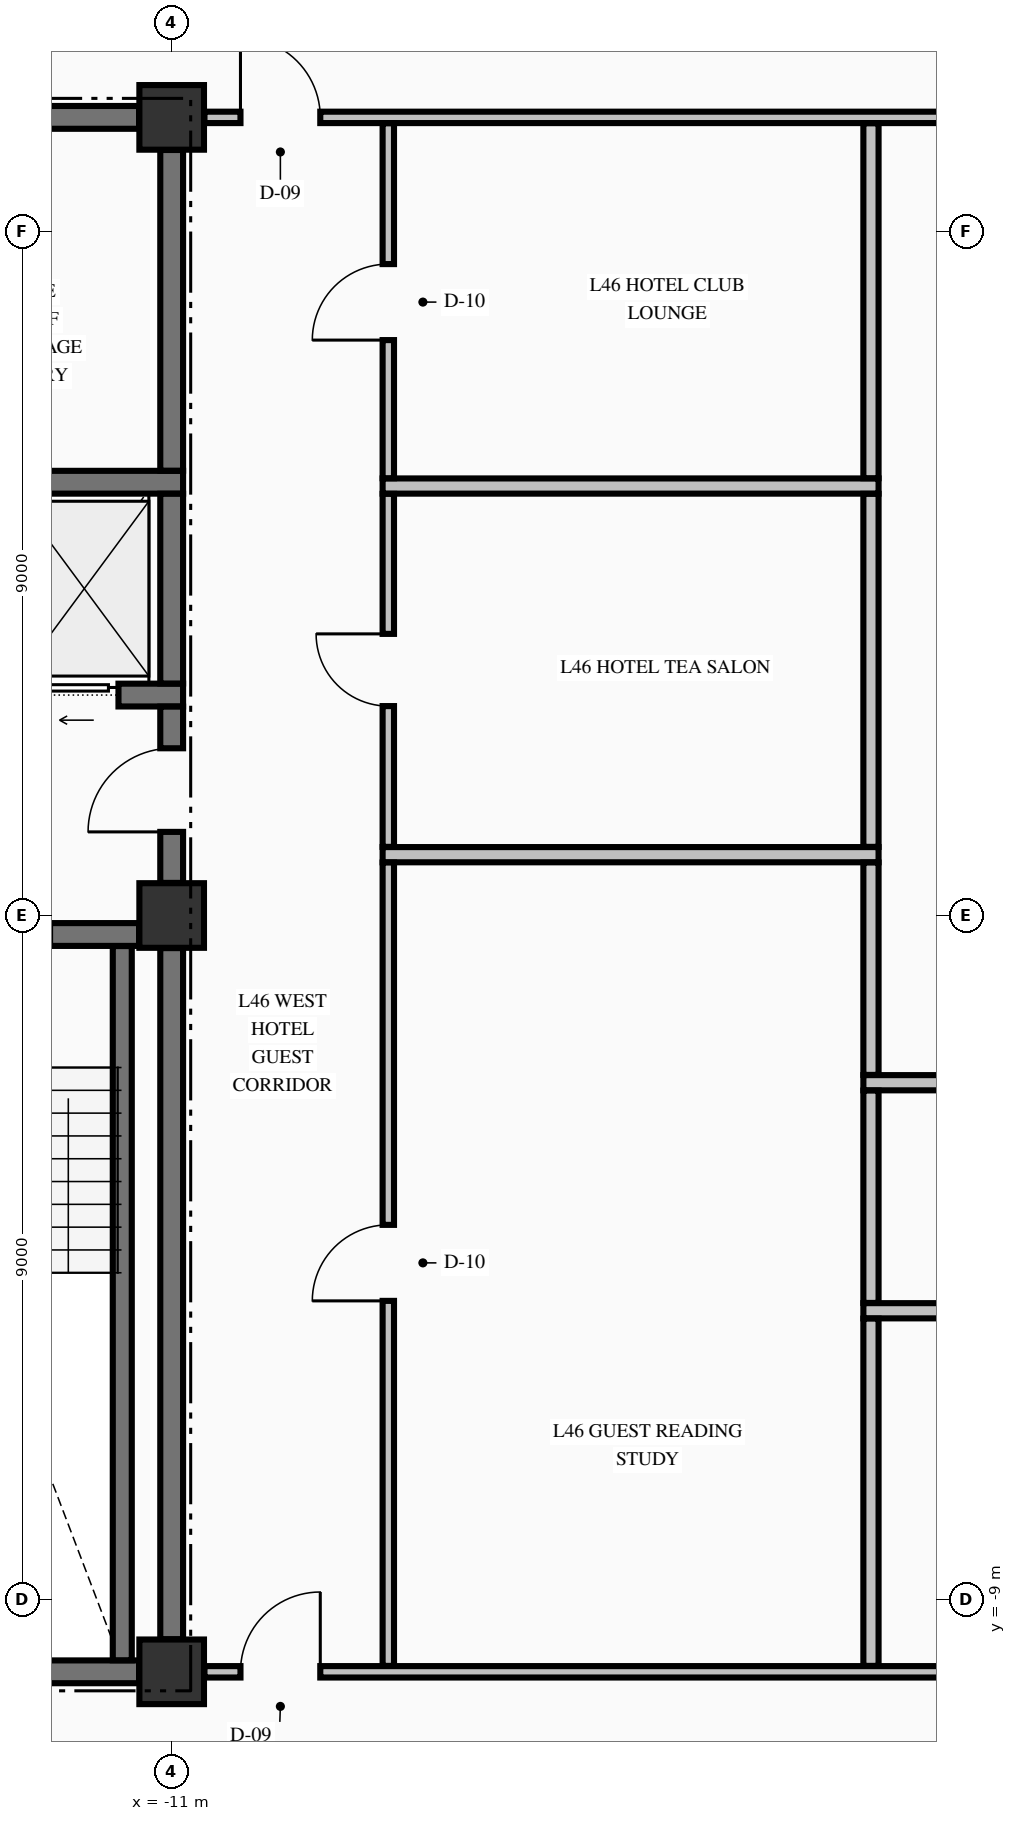
"""IFC4 building model, lengths in metres.
Left out: names, types, materials, properties, quantities, classifications, styles, units other than length and angle.
Written with IfcOpenShell. Run it as: python <this file> out.ifc"""

import sys

from ifc_helpers import new_model, si_unit, direction, frame, frame_2d, origin, origin_2d, place, context, subcontext, project, spatial, rectangle, extrude, element, fill, save


model = new_model("IFC4")
c1 = context("Model", 3, precision=1e-05, world=origin(), true_north=direction((0.0, 1.0)))
c2 = subcontext(c1, "Body", "Model", "MODEL_VIEW")
j1 = project(units=[si_unit("LENGTHUNIT", "METRE"), si_unit("PLANEANGLEUNIT", "RADIAN")], contexts=[c1])
p1 = place(None, origin())
s1 = spatial("IfcSite", under=j1, at=p1, CompositionType="ELEMENT")
p2 = place(p1, origin())
s2 = spatial("IfcBuilding", under=s1, at=p2, CompositionType="ELEMENT")
p3 = place(p2, frame((0.0, 0.0, 179.66)))
s3 = spatial("IfcBuildingStorey", under=s2, at=p3, CompositionType="ELEMENT", Elevation=179.66)
for number, where, z_axis, x_axis in (
    (1, (-11.0, -9.95, -0.25), (0.0, 0.0, 1.0), (1.0, 0.0, 0.0)),
    (2, (-11.0, 0.0, -0.25), (0.0, 0.0, 1.0), (1.0, 0.0, 0.0)),
    (3, (-11.0, 10.5, -0.25), (0.0, 0.0, 1.0), (1.0, 0.0, 0.0)),
):
    element("IfcColumn", number, at=place(p3, frame(where, z_axis=z_axis, x_axis=x_axis)), inside=s3, PredefinedType="COLUMN", context=c2, shape_type="SweptSolid", body=[
        extrude(rectangle(XDim=0.85, YDim=0.85, at=origin_2d()), origin(), (0.0, 0.0, 1.0), 3.4),
    ])
p4 = place(p3, frame((-14.7, -9.95, 0.0), z_axis=(0.0, 0.0, 1.0), x_axis=(1.0, 0.0, 0.0)))
e4 = element("IfcWall", 4, at=p4, inside=s3, PredefinedType="SHEAR", context=c2, shape_type="SweptSolid", body=[
    extrude(rectangle(XDim=3.271, YDim=0.3, at=frame_2d((1.635, 0.0))), origin(), (0.0, 0.0, 1.0), 3.15),
])
p5 = place(p3, frame((-19.571, -0.25, 0.0), z_axis=(0.0, 0.0, 1.0), x_axis=(1.0, 0.0, 0.0)))
e5 = element("IfcWall", 5, at=p5, inside=s3, PredefinedType="SHEAR", context=c2, shape_type="SweptSolid", body=[
    extrude(rectangle(XDim=8.142, YDim=0.3, at=frame_2d((4.071, 0.0))), origin(), (0.0, 0.0, 1.0), 3.15),
])
p6 = place(p5, frame((5.871, 0.0, 0.0)))
e6 = element("IfcOpeningElement", 6, at=p6, cuts=e5, PredefinedType="OPENING", context=c2, shape_type="SweptSolid", body=[
    extrude(rectangle(XDim=1.1, YDim=2.15, at=frame_2d((0.55, 1.075))), frame((0.0, 0.16, 0.0), z_axis=(0.0, -1.0, 0.0), x_axis=(1.0, 0.0, 0.0)), (0.0, 0.0, 1.0), 0.32),
])
p7 = place(p3, frame((-14.875, 2.9, 0.0), z_axis=(0.0, 0.0, 1.0), x_axis=(1.0, 0.0, 0.0)))
e7 = element("IfcWall", 7, at=p7, inside=s3, PredefinedType="SHEAR", context=c2, shape_type="SweptSolid", body=[
    extrude(rectangle(XDim=4.025, YDim=0.3, at=frame_2d((2.012, 0.0))), origin(), (0.0, 0.0, 1.0), 3.15),
])
p8 = place(p7, frame((2.075, 0.0, 0.0)))
e8 = element("IfcOpeningElement", 8, at=p8, cuts=e7, PredefinedType="OPENING", context=c2, shape_type="SweptSolid", body=[
    extrude(rectangle(XDim=1.1, YDim=2.2, at=frame_2d((0.55, 1.1))), frame((0.0, 0.16, 0.0), z_axis=(0.0, -1.0, 0.0), x_axis=(1.0, 0.0, 0.0)), (0.0, 0.0, 1.0), 0.32),
])
p9 = place(p3, frame((-14.875, 5.7, 0.0), z_axis=(0.0, 0.0, 1.0), x_axis=(1.0, 0.0, 0.0)))
e9 = element("IfcWall", 9, at=p9, inside=s3, PredefinedType="SHEAR", context=c2, shape_type="SweptSolid", body=[
    extrude(rectangle(XDim=4.025, YDim=0.3, at=frame_2d((2.012, 0.0))), origin(), (0.0, 0.0, 1.0), 3.15),
])
p10 = place(p3, frame((-14.7, 10.5, 0.0), z_axis=(0.0, 0.0, 1.0), x_axis=(1.0, 0.0, 0.0)))
e10 = element("IfcWall", 10, at=p10, inside=s3, PredefinedType="SHEAR", context=c2, shape_type="SweptSolid", body=[
    extrude(rectangle(XDim=3.271, YDim=0.3, at=frame_2d((1.635, 0.0))), origin(), (0.0, 0.0, 1.0), 3.15),
])
p11 = place(p10, frame((0.775, 0.0, 0.0)))
e11 = element("IfcOpeningElement", 11, at=p11, cuts=e10, PredefinedType="OPENING", context=c2, shape_type="SweptSolid", body=[
    extrude(rectangle(XDim=0.95, YDim=2.15, at=frame_2d((0.475, 1.075))), frame((0.0, 0.16, 0.0), z_axis=(0.0, -1.0, 0.0), x_axis=(1.0, 0.0, 0.0)), (0.0, 0.0, 1.0), 0.32),
])
p12 = place(p3, frame((-10.569, -9.95, 0.0), z_axis=(0.0, 0.0, 1.0), x_axis=(1.0, 0.0, 0.0)))
e12 = element("IfcWall", 12, at=p12, inside=s3, PredefinedType="PARTITIONING", context=c2, shape_type="SweptSolid", body=[
    extrude(rectangle(XDim=21.138, YDim=0.15, at=frame_2d((10.569, 0.0))), origin(), (0.0, 0.0, 1.0), 3.15),
])
p13 = place(p12, frame((0.474, 0.0, 0.0)))
e13 = element("IfcOpeningElement", 13, at=p13, cuts=e12, PredefinedType="OPENING", context=c2, shape_type="SweptSolid", body=[
    extrude(rectangle(XDim=1.05, YDim=2.15, at=frame_2d((0.525, 1.075))), frame((0.0, 0.085, 0.0), z_axis=(0.0, -1.0, 0.0), x_axis=(1.0, 0.0, 0.0)), (0.0, 0.0, 1.0), 0.17),
])
p14 = place(p12, frame((19.614, 0.0, 0.0)))
e14 = element("IfcOpeningElement", 14, at=p14, cuts=e12, PredefinedType="OPENING", context=c2, shape_type="SweptSolid", body=[
    extrude(rectangle(XDim=1.05, YDim=2.15, at=frame_2d((0.525, 1.075))), frame((0.0, 0.085, 0.0), z_axis=(0.0, -1.0, 0.0), x_axis=(1.0, 0.0, 0.0)), (0.0, 0.0, 1.0), 0.17),
])
p15 = place(p12, frame((11.774, 0.0, 0.0)))
e15 = element("IfcOpeningElement", 15, at=p15, cuts=e12, PredefinedType="OPENING", context=c2, shape_type="SweptSolid", body=[
    extrude(rectangle(XDim=0.95, YDim=2.15, at=frame_2d((0.475, 1.075))), frame((0.0, 0.085, 0.0), z_axis=(0.0, -1.0, 0.0), x_axis=(1.0, 0.0, 0.0)), (0.0, 0.0, 1.0), 0.17),
])
for number, where, z_axis, x_axis in (
    (16, (-1.9, -5.2, 0.0), (0.0, 0.0, 1.0), (1.0, 0.0, 0.0)),
    (17, (-1.9, -2.2, 0.0), (0.0, 0.0, 1.0), (1.0, 0.0, 0.0)),
):
    element("IfcWall", number, at=place(p3, frame(where, z_axis=z_axis, x_axis=x_axis)), inside=s3, PredefinedType="PARTITIONING", context=c2, shape_type="SweptSolid", body=[
        extrude(rectangle(XDim=10.125, YDim=0.2, at=frame_2d((5.062, 0.0))), origin(), (0.0, 0.0, 1.0), 3.15),
    ])
for number, where, z_axis, x_axis in (
    (18, (-8.225, 0.8, 0.0), (0.0, 0.0, 1.0), (1.0, 0.0, 0.0)),
    (19, (-8.225, 5.65, 0.0), (0.0, 0.0, 1.0), (1.0, 0.0, 0.0)),
):
    element("IfcWall", number, at=place(p3, frame(where, z_axis=z_axis, x_axis=x_axis)), inside=s3, PredefinedType="PARTITIONING", context=c2, shape_type="SweptSolid", body=[
        extrude(rectangle(XDim=6.525, YDim=0.2, at=frame_2d((3.263, 0.0))), origin(), (0.0, 0.0, 1.0), 3.15),
    ])
p16 = place(p3, frame((-10.569, 10.5, 0.0), z_axis=(0.0, 0.0, 1.0), x_axis=(1.0, 0.0, 0.0)))
e20 = element("IfcWall", 20, at=p16, inside=s3, PredefinedType="PARTITIONING", context=c2, shape_type="SweptSolid", body=[
    extrude(rectangle(XDim=21.138, YDim=0.15, at=frame_2d((10.569, 0.0))), origin(), (0.0, 0.0, 1.0), 3.15),
])
p17 = place(p16, frame((0.474, 0.0, 0.0)))
e21 = element("IfcOpeningElement", 21, at=p17, cuts=e20, PredefinedType="OPENING", context=c2, shape_type="SweptSolid", body=[
    extrude(rectangle(XDim=1.05, YDim=2.15, at=frame_2d((0.525, 1.075))), frame((0.0, 0.085, 0.0), z_axis=(0.0, -1.0, 0.0), x_axis=(1.0, 0.0, 0.0)), (0.0, 0.0, 1.0), 0.17),
])
p18 = place(p16, frame((19.614, 0.0, 0.0)))
e22 = element("IfcOpeningElement", 22, at=p18, cuts=e20, PredefinedType="OPENING", context=c2, shape_type="SweptSolid", body=[
    extrude(rectangle(XDim=1.05, YDim=2.15, at=frame_2d((0.525, 1.075))), frame((0.0, 0.085, 0.0), z_axis=(0.0, -1.0, 0.0), x_axis=(1.0, 0.0, 0.0)), (0.0, 0.0, 1.0), 0.17),
])
p19 = place(p3, frame((-11.65, -9.798, 0.0), z_axis=(0.0, 0.0, 1.0), x_axis=(0.0, 1.0, 0.0)))
e23 = element("IfcWall", 23, at=p19, inside=s3, PredefinedType="SOLIDWALL", context=c2, shape_type="SweptSolid", body=[
    extrude(rectangle(XDim=9.396, YDim=0.25, at=frame_2d((4.698, 0.0))), origin(), (0.0, 0.0, 1.0), 3.15),
])
p20 = place(p3, frame((-11.0, -9.521, 0.0), z_axis=(0.0, 0.0, 1.0), x_axis=(0.0, 1.0, 0.0)))
e24 = element("IfcWall", 24, at=p20, inside=s3, PredefinedType="SHEAR", context=c2, shape_type="SweptSolid", body=[
    extrude(rectangle(XDim=9.092, YDim=0.3, at=frame_2d((4.546, 0.0))), origin(), (0.0, 0.0, 1.0), 3.15),
])
p21 = place(p3, frame((-11.0, 0.429, 0.0), z_axis=(0.0, 0.0, 1.0), x_axis=(0.0, 1.0, 0.0)))
e25 = element("IfcWall", 25, at=p21, inside=s3, PredefinedType="SHEAR", context=c2, shape_type="SweptSolid", body=[
    extrude(rectangle(XDim=2.319, YDim=0.3, at=frame_2d((1.16, 0.0))), origin(), (0.0, 0.0, 1.0), 3.15),
])
p22 = place(p21, frame((0.671, 0.0, 0.0)))
e26 = element("IfcOpeningElement", 26, at=p22, cuts=e25, PredefinedType="OPENING", context=c2, shape_type="SweptSolid", body=[
    extrude(rectangle(XDim=1.1, YDim=2.15, at=frame_2d((0.55, 1.075))), frame((0.0, 0.16, 0.0), z_axis=(0.0, -1.0, 0.0), x_axis=(1.0, 0.0, 0.0)), (0.0, 0.0, 1.0), 0.32),
])
p23 = place(p3, frame((-11.0, 3.052, 0.0), z_axis=(0.0, 0.0, 1.0), x_axis=(0.0, 1.0, 0.0)))
e27 = element("IfcWall", 27, at=p23, inside=s3, PredefinedType="SHEAR", context=c2, shape_type="SweptSolid", body=[
    extrude(rectangle(XDim=2.496, YDim=0.3, at=frame_2d((1.248, 0.0))), origin(), (0.0, 0.0, 1.0), 3.15),
])
p24 = place(p3, frame((-11.0, 5.852, 0.0), z_axis=(0.0, 0.0, 1.0), x_axis=(0.0, 1.0, 0.0)))
e28 = element("IfcWall", 28, at=p24, inside=s3, PredefinedType="SHEAR", context=c2, shape_type="SweptSolid", body=[
    extrude(rectangle(XDim=4.219, YDim=0.3, at=frame_2d((2.109, 0.0))), origin(), (0.0, 0.0, 1.0), 3.15),
])
p25 = place(p3, frame((-8.15, -9.872, 0.0), z_axis=(0.0, 0.0, 1.0), x_axis=(0.0, 1.0, 0.0)))
e29 = element("IfcWall", 29, at=p25, inside=s3, PredefinedType="PARTITIONING", context=c2, shape_type="SweptSolid", body=[
    extrude(rectangle(XDim=10.569, YDim=0.15, at=frame_2d((5.285, 0.0))), origin(), (0.0, 0.0, 1.0), 3.15),
])
p26 = place(p25, frame((4.802, 0.0, 0.0)))
e30 = element("IfcOpeningElement", 30, at=p26, cuts=e29, PredefinedType="OPENING", context=c2, shape_type="SweptSolid", body=[
    extrude(rectangle(XDim=1.0, YDim=2.15, at=frame_2d((0.5, 1.075))), frame((0.0, 0.085, 0.0), z_axis=(0.0, -1.0, 0.0), x_axis=(1.0, 0.0, 0.0)), (0.0, 0.0, 1.0), 0.17),
])
p27 = place(p3, frame((-8.15, 0.903, 0.0), z_axis=(0.0, 0.0, 1.0), x_axis=(0.0, 1.0, 0.0)))
e31 = element("IfcWall", 31, at=p27, inside=s3, PredefinedType="PARTITIONING", context=c2, shape_type="SweptSolid", body=[
    extrude(rectangle(XDim=4.644, YDim=0.15, at=frame_2d((2.322, 0.0))), origin(), (0.0, 0.0, 1.0), 3.15),
])
p28 = place(p27, frame((1.852, 0.0, 0.0)))
e32 = element("IfcOpeningElement", 32, at=p28, cuts=e31, PredefinedType="OPENING", context=c2, shape_type="SweptSolid", body=[
    extrude(rectangle(XDim=0.95, YDim=2.15, at=frame_2d((0.475, 1.075))), frame((0.0, 0.085, 0.0), z_axis=(0.0, -1.0, 0.0), x_axis=(1.0, 0.0, 0.0)), (0.0, 0.0, 1.0), 0.17),
])
p29 = place(p3, frame((-8.15, 5.753, 0.0), z_axis=(0.0, 0.0, 1.0), x_axis=(0.0, 1.0, 0.0)))
e33 = element("IfcWall", 33, at=p29, inside=s3, PredefinedType="PARTITIONING", context=c2, shape_type="SweptSolid", body=[
    extrude(rectangle(XDim=4.669, YDim=0.15, at=frame_2d((2.334, 0.0))), origin(), (0.0, 0.0, 1.0), 3.15),
])
p30 = place(p29, frame((1.817, 0.0, 0.0)))
e34 = element("IfcOpeningElement", 34, at=p30, cuts=e33, PredefinedType="OPENING", context=c2, shape_type="SweptSolid", body=[
    extrude(rectangle(XDim=1.0, YDim=2.15, at=frame_2d((0.5, 1.075))), frame((0.0, 0.085, 0.0), z_axis=(0.0, -1.0, 0.0), x_axis=(1.0, 0.0, 0.0)), (0.0, 0.0, 1.0), 0.17),
])
p31 = place(p3, frame((-1.8, -9.872, 0.0), z_axis=(0.0, 0.0, 1.0), x_axis=(0.0, 1.0, 0.0)))
e35 = element("IfcWall", 35, at=p31, inside=s3, PredefinedType="PARTITIONING", context=c2, shape_type="SweptSolid", body=[
    extrude(rectangle(XDim=4.569, YDim=0.2, at=frame_2d((2.285, 0.0))), origin(), (0.0, 0.0, 1.0), 3.15),
])
for number, where, z_axis, x_axis in (
    (36, (-1.8, -5.097, 0.0), (0.0, 0.0, 1.0), (0.0, 1.0, 0.0)),
    (37, (-1.8, -2.097, 0.0), (0.0, 0.0, 1.0), (0.0, 1.0, 0.0)),
):
    element("IfcWall", number, at=place(p3, frame(where, z_axis=z_axis, x_axis=x_axis)), inside=s3, PredefinedType="PARTITIONING", context=c2, shape_type="SweptSolid", body=[
        extrude(rectangle(XDim=2.794, YDim=0.2, at=frame_2d((1.397, 0.0))), origin(), (0.0, 0.0, 1.0), 3.15),
    ])
p32 = place(p3, frame((-1.8, 0.903, 0.0), z_axis=(0.0, 0.0, 1.0), x_axis=(0.0, 1.0, 0.0)))
e38 = element("IfcWall", 38, at=p32, inside=s3, PredefinedType="PARTITIONING", context=c2, shape_type="SweptSolid", body=[
    extrude(rectangle(XDim=4.644, YDim=0.2, at=frame_2d((2.322, 0.0))), origin(), (0.0, 0.0, 1.0), 3.15),
])
p33 = place(p3, frame((-1.8, 5.753, 0.0), z_axis=(0.0, 0.0, 1.0), x_axis=(0.0, 1.0, 0.0)))
e39 = element("IfcWall", 39, at=p33, inside=s3, PredefinedType="PARTITIONING", context=c2, shape_type="SweptSolid", body=[
    extrude(rectangle(XDim=4.669, YDim=0.2, at=frame_2d((2.334, 0.0))), origin(), (0.0, 0.0, 1.0), 3.15),
])
p34 = place(p22, origin())
e40 = element("IfcDoor", 40, at=p34, inside=s3, OperationType="SINGLE_SWING_LEFT", PredefinedType="DOOR", context=c2, shape_type="SweptSolid", body=[
    extrude(rectangle(XDim=1.1, YDim=2.15, at=frame_2d((0.55, 1.075))), frame((0.0, 0.025, 0.0), z_axis=(0.0, -1.0, 0.0), x_axis=(1.0, 0.0, 0.0)), (0.0, 0.0, 1.0), 0.05),
])
fill(e26, e40)
p35 = place(p8, origin())
e41 = element("IfcDoor", 41, at=p35, inside=s3, OperationType="SLIDING_TO_LEFT", PredefinedType="DOOR", context=c2, shape_type="SweptSolid", body=[
    extrude(rectangle(XDim=1.1, YDim=2.2, at=frame_2d((0.55, 1.1))), frame((0.0, 0.025, 0.0), z_axis=(0.0, -1.0, 0.0), x_axis=(1.0, 0.0, 0.0)), (0.0, 0.0, 1.0), 0.05),
])
fill(e8, e41)
p36 = place(p17, origin())
e42 = element("IfcDoor", 42, at=p36, inside=s3, OperationType="SINGLE_SWING_LEFT", PredefinedType="DOOR", context=c2, shape_type="SweptSolid", body=[
    extrude(rectangle(XDim=1.05, YDim=2.15, at=frame_2d((0.525, 1.075))), frame((0.0, 0.025, 0.0), z_axis=(0.0, -1.0, 0.0), x_axis=(1.0, 0.0, 0.0)), (0.0, 0.0, 1.0), 0.05),
])
fill(e21, e42)
p37 = place(p13, origin())
e43 = element("IfcDoor", 43, at=p37, inside=s3, OperationType="SINGLE_SWING_RIGHT", PredefinedType="DOOR", context=c2, shape_type="SweptSolid", body=[
    extrude(rectangle(XDim=1.05, YDim=2.15, at=frame_2d((0.525, 1.075))), frame((0.0, 0.025, 0.0), z_axis=(0.0, -1.0, 0.0), x_axis=(1.0, 0.0, 0.0)), (0.0, 0.0, 1.0), 0.05),
])
fill(e13, e43)
p38 = place(p30, origin())
e44 = element("IfcDoor", 44, at=p38, inside=s3, OperationType="SINGLE_SWING_LEFT", PredefinedType="DOOR", context=c2, shape_type="SweptSolid", body=[
    extrude(rectangle(XDim=1.0, YDim=2.15, at=frame_2d((0.5, 1.075))), frame((0.0, 0.025, 0.0), z_axis=(0.0, -1.0, 0.0), x_axis=(1.0, 0.0, 0.0)), (0.0, 0.0, 1.0), 0.05),
])
fill(e34, e44)
p39 = place(p28, origin())
e45 = element("IfcDoor", 45, at=p39, inside=s3, OperationType="SINGLE_SWING_RIGHT", PredefinedType="DOOR", context=c2, shape_type="SweptSolid", body=[
    extrude(rectangle(XDim=0.95, YDim=2.15, at=frame_2d((0.475, 1.075))), frame((0.0, 0.025, 0.0), z_axis=(0.0, -1.0, 0.0), x_axis=(1.0, 0.0, 0.0)), (0.0, 0.0, 1.0), 0.05),
])
fill(e32, e45)
p40 = place(p26, origin())
e46 = element("IfcDoor", 46, at=p40, inside=s3, OperationType="SINGLE_SWING_LEFT", PredefinedType="DOOR", context=c2, shape_type="SweptSolid", body=[
    extrude(rectangle(XDim=1.0, YDim=2.15, at=frame_2d((0.5, 1.075))), frame((0.0, 0.025, 0.0), z_axis=(0.0, -1.0, 0.0), x_axis=(1.0, 0.0, 0.0)), (0.0, 0.0, 1.0), 0.05),
])
fill(e30, e46)
save(model, sys.argv[1])
